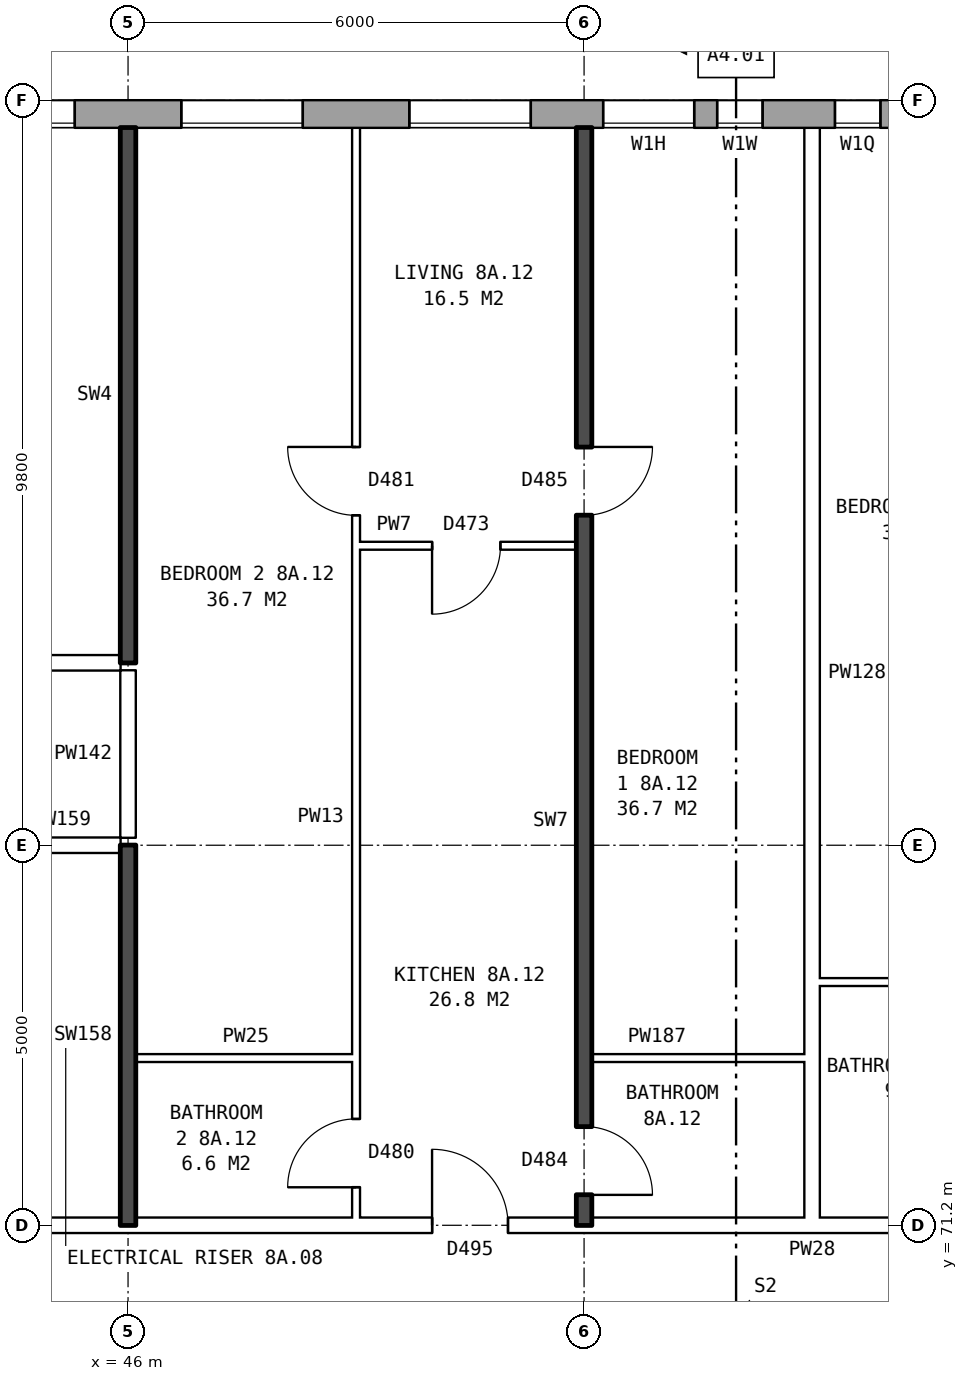
"""IFC4 building model, lengths in metres.
Left out: names, types, materials, properties, quantities, classifications, styles, units other than length and angle.
Written with IfcOpenShell. Run it as: python <this file> out.ifc"""

import sys

from ifc_helpers import new_model, si_unit, direction, frame, frame_2d, origin, place, context, subcontext, project, spatial, rectangle, extrude, element, fill, save


model = new_model("IFC4")
c1 = context("Model", 3, precision=1e-05, world=origin(), true_north=direction((0.0, 1.0)))
c2 = subcontext(c1, "Body", "Model", "MODEL_VIEW")
j1 = project(units=[si_unit("LENGTHUNIT", "METRE"), si_unit("PLANEANGLEUNIT", "RADIAN")], contexts=[c1])
p1 = place(None, origin())
s1 = spatial("IfcSite", under=j1, at=p1, CompositionType="ELEMENT")
p2 = place(p1, origin())
s2 = spatial("IfcBuilding", under=s1, at=p2, CompositionType="ELEMENT")
p3 = place(p2, frame((0.0, 0.0, 31.9)))
s3 = spatial("IfcBuildingStorey", under=s2, at=p3, CompositionType="ELEMENT", Elevation=31.9)
p4 = place(p3, frame((72.925, 85.82, 0.0), z_axis=(0.0, 0.0, 1.0), x_axis=(-1.0, 0.0, 0.0)))
e1 = element("IfcWall", 1, at=p4, inside=s3, PredefinedType="STANDARD", context=c2, shape_type="SweptSolid", body=[
    extrude(rectangle(XDim=50.101, YDim=0.36, at=frame_2d((25.05, 0.0))), origin(), (0.0, 0.0, 1.0), 2.85),
])
p5 = place(p4, frame((0.625, 0.0, 0.8)))
e2 = element("IfcOpeningElement", 2, at=p5, cuts=e1, PredefinedType="OPENING", context=c2, shape_type="SweptSolid", body=[
    extrude(rectangle(XDim=1.6, YDim=1.8, at=frame_2d((0.8, 0.9))), frame((0.0, 0.19, 0.0), z_axis=(0.0, -1.0, 0.0), x_axis=(1.0, 0.0, 0.0)), (0.0, 0.0, 1.0), 0.38),
])
p6 = place(p4, frame((3.625, 0.0, 0.8)))
e3 = element("IfcOpeningElement", 3, at=p6, cuts=e1, PredefinedType="OPENING", context=c2, shape_type="SweptSolid", body=[
    extrude(rectangle(XDim=1.6, YDim=1.8, at=frame_2d((0.8, 0.9))), frame((0.0, 0.19, 0.0), z_axis=(0.0, -1.0, 0.0), x_axis=(1.0, 0.0, 0.0)), (0.0, 0.0, 1.0), 0.38),
])
p7 = place(p4, frame((6.625, 0.0, 0.8)))
e4 = element("IfcOpeningElement", 4, at=p7, cuts=e1, PredefinedType="OPENING", context=c2, shape_type="SweptSolid", body=[
    extrude(rectangle(XDim=1.6, YDim=1.8, at=frame_2d((0.8, 0.9))), frame((0.0, 0.19, 0.0), z_axis=(0.0, -1.0, 0.0), x_axis=(1.0, 0.0, 0.0)), (0.0, 0.0, 1.0), 0.38),
])
p8 = place(p4, frame((9.625, 0.0, 0.8)))
e5 = element("IfcOpeningElement", 5, at=p8, cuts=e1, PredefinedType="OPENING", context=c2, shape_type="SweptSolid", body=[
    extrude(rectangle(XDim=1.6, YDim=1.8, at=frame_2d((0.8, 0.9))), frame((0.0, 0.19, 0.0), z_axis=(0.0, -1.0, 0.0), x_axis=(1.0, 0.0, 0.0)), (0.0, 0.0, 1.0), 0.38),
])
p9 = place(p4, frame((12.625, 0.0, 0.8)))
e6 = element("IfcOpeningElement", 6, at=p9, cuts=e1, PredefinedType="OPENING", context=c2, shape_type="SweptSolid", body=[
    extrude(rectangle(XDim=1.6, YDim=1.8, at=frame_2d((0.8, 0.9))), frame((0.0, 0.19, 0.0), z_axis=(0.0, -1.0, 0.0), x_axis=(1.0, 0.0, 0.0)), (0.0, 0.0, 1.0), 0.38),
])
p10 = place(p4, frame((15.125, 0.0, 0.8)))
e7 = element("IfcOpeningElement", 7, at=p10, cuts=e1, PredefinedType="OPENING", context=c2, shape_type="SweptSolid", body=[
    extrude(rectangle(XDim=1.6, YDim=1.8, at=frame_2d((0.8, 0.9))), frame((0.0, 0.19, 0.0), z_axis=(0.0, -1.0, 0.0), x_axis=(1.0, 0.0, 0.0)), (0.0, 0.0, 1.0), 0.38),
])
p11 = place(p4, frame((18.575, 0.0, 0.15)))
e8 = element("IfcOpeningElement", 8, at=p11, cuts=e1, PredefinedType="OPENING", context=c2, shape_type="SweptSolid", body=[
    extrude(rectangle(XDim=0.6, YDim=0.9, at=frame_2d((0.3, 0.45))), frame((0.0, 0.19, 0.0), z_axis=(0.0, -1.0, 0.0), x_axis=(1.0, 0.0, 0.0)), (0.0, 0.0, 1.0), 0.38),
])
p12 = place(p4, frame((21.625, 0.0, 0.8)))
e9 = element("IfcOpeningElement", 9, at=p12, cuts=e1, PredefinedType="OPENING", context=c2, shape_type="SweptSolid", body=[
    extrude(rectangle(XDim=1.6, YDim=1.8, at=frame_2d((0.8, 0.9))), frame((0.0, 0.19, 0.0), z_axis=(0.0, -1.0, 0.0), x_axis=(1.0, 0.0, 0.0)), (0.0, 0.0, 1.0), 0.38),
])
p13 = place(p4, frame((24.625, 0.0, 0.8)))
e10 = element("IfcOpeningElement", 10, at=p13, cuts=e1, PredefinedType="OPENING", context=c2, shape_type="SweptSolid", body=[
    extrude(rectangle(XDim=1.6, YDim=1.8, at=frame_2d((0.8, 0.9))), frame((0.0, 0.19, 0.0), z_axis=(0.0, -1.0, 0.0), x_axis=(1.0, 0.0, 0.0)), (0.0, 0.0, 1.0), 0.38),
])
p14 = place(p4, frame((27.625, 0.0, 0.8)))
e11 = element("IfcOpeningElement", 11, at=p14, cuts=e1, PredefinedType="OPENING", context=c2, shape_type="SweptSolid", body=[
    extrude(rectangle(XDim=1.6, YDim=1.8, at=frame_2d((0.8, 0.9))), frame((0.0, 0.19, 0.0), z_axis=(0.0, -1.0, 0.0), x_axis=(1.0, 0.0, 0.0)), (0.0, 0.0, 1.0), 0.38),
])
p15 = place(p4, frame((29.525, 0.0, 0.8)))
e12 = element("IfcOpeningElement", 12, at=p15, cuts=e1, PredefinedType="OPENING", context=c2, shape_type="SweptSolid", body=[
    extrude(rectangle(XDim=1.0, YDim=0.9, at=frame_2d((0.5, 0.45))), frame((0.0, 0.19, 0.0), z_axis=(0.0, -1.0, 0.0), x_axis=(1.0, 0.0, 0.0)), (0.0, 0.0, 1.0), 0.38),
])
p16 = place(p4, frame((33.625, 0.0, 0.8)))
e13 = element("IfcOpeningElement", 13, at=p16, cuts=e1, PredefinedType="OPENING", context=c2, shape_type="SweptSolid", body=[
    extrude(rectangle(XDim=1.6, YDim=1.8, at=frame_2d((0.8, 0.9))), frame((0.0, 0.19, 0.0), z_axis=(0.0, -1.0, 0.0), x_axis=(1.0, 0.0, 0.0)), (0.0, 0.0, 1.0), 0.38),
])
p17 = place(p4, frame((36.625, 0.0, 0.8)))
e14 = element("IfcOpeningElement", 14, at=p17, cuts=e1, PredefinedType="OPENING", context=c2, shape_type="SweptSolid", body=[
    extrude(rectangle(XDim=1.6, YDim=1.8, at=frame_2d((0.8, 0.9))), frame((0.0, 0.19, 0.0), z_axis=(0.0, -1.0, 0.0), x_axis=(1.0, 0.0, 0.0)), (0.0, 0.0, 1.0), 0.38),
])
p18 = place(p4, frame((39.625, 0.0, 0.8)))
e15 = element("IfcOpeningElement", 15, at=p18, cuts=e1, PredefinedType="OPENING", context=c2, shape_type="SweptSolid", body=[
    extrude(rectangle(XDim=1.6, YDim=1.8, at=frame_2d((0.8, 0.9))), frame((0.0, 0.19, 0.0), z_axis=(0.0, -1.0, 0.0), x_axis=(1.0, 0.0, 0.0)), (0.0, 0.0, 1.0), 0.38),
])
p19 = place(p4, frame((42.625, 0.0, 0.8)))
e16 = element("IfcOpeningElement", 16, at=p19, cuts=e1, PredefinedType="OPENING", context=c2, shape_type="SweptSolid", body=[
    extrude(rectangle(XDim=1.6, YDim=1.8, at=frame_2d((0.8, 0.9))), frame((0.0, 0.19, 0.0), z_axis=(0.0, -1.0, 0.0), x_axis=(1.0, 0.0, 0.0)), (0.0, 0.0, 1.0), 0.38),
])
p20 = place(p4, frame((45.625, 0.0, 0.8)))
e17 = element("IfcOpeningElement", 17, at=p20, cuts=e1, PredefinedType="OPENING", context=c2, shape_type="SweptSolid", body=[
    extrude(rectangle(XDim=1.6, YDim=1.8, at=frame_2d((0.8, 0.9))), frame((0.0, 0.19, 0.0), z_axis=(0.0, -1.0, 0.0), x_axis=(1.0, 0.0, 0.0)), (0.0, 0.0, 1.0), 0.38),
])
p21 = place(p4, frame((17.025, 0.0, 1.4)))
e18 = element("IfcOpeningElement", 18, at=p21, cuts=e1, PredefinedType="OPENING", context=c2, shape_type="SweptSolid", body=[
    extrude(rectangle(XDim=0.6, YDim=1.2, at=frame_2d((0.3, 0.6))), frame((0.0, 0.19, 0.0), z_axis=(0.0, -1.0, 0.0), x_axis=(1.0, 0.0, 0.0)), (0.0, 0.0, 1.0), 0.38),
])
p22 = place(p4, frame((19.475, 0.0, 0.15)))
e19 = element("IfcOpeningElement", 19, at=p22, cuts=e1, PredefinedType="OPENING", context=c2, shape_type="SweptSolid", body=[
    extrude(rectangle(XDim=1.2, YDim=1.5, at=frame_2d((0.6, 0.75))), frame((0.0, 0.19, 0.0), z_axis=(0.0, -1.0, 0.0), x_axis=(1.0, 0.0, 0.0)), (0.0, 0.0, 1.0), 0.38),
])
p23 = place(p4, frame((31.975, 0.0, 1.7)))
e20 = element("IfcOpeningElement", 20, at=p23, cuts=e1, PredefinedType="OPENING", context=c2, shape_type="SweptSolid", body=[
    extrude(rectangle(XDim=0.6, YDim=0.9, at=frame_2d((0.3, 0.45))), frame((0.0, 0.19, 0.0), z_axis=(0.0, -1.0, 0.0), x_axis=(1.0, 0.0, 0.0)), (0.0, 0.0, 1.0), 0.38),
])
p24 = place(p3, frame((44.36, 71.2, 0.0), z_axis=(0.0, 0.0, 1.0), x_axis=(1.0, 0.0, 0.0)))
e21 = element("IfcWall", 21, at=p24, inside=s3, PredefinedType="PARTITIONING", context=c2, shape_type="SweptSolid", body=[
    extrude(rectangle(XDim=19.28, YDim=0.2, at=frame_2d((9.64, 0.0))), origin(), (0.0, 0.0, 1.0), 2.85),
])
p25 = place(p24, frame((14.64, 0.0, 0.0)))
e22 = element("IfcOpeningElement", 22, at=p25, cuts=e21, PredefinedType="OPENING", context=c2, shape_type="SweptSolid", body=[
    extrude(rectangle(XDim=1.0, YDim=2.1, at=frame_2d((0.5, 1.05))), frame((0.0, 0.11, 0.0), z_axis=(0.0, -1.0, 0.0), x_axis=(1.0, 0.0, 0.0)), (0.0, 0.0, 1.0), 0.22),
])
p26 = place(p24, frame((5.64, 0.0, 0.0)))
e23 = element("IfcOpeningElement", 23, at=p26, cuts=e21, PredefinedType="OPENING", context=c2, shape_type="SweptSolid", body=[
    extrude(rectangle(XDim=1.0, YDim=2.1, at=frame_2d((0.5, 1.05))), frame((0.0, 0.11, 0.0), z_axis=(0.0, -1.0, 0.0), x_axis=(1.0, 0.0, 0.0)), (0.0, 0.0, 1.0), 0.22),
])
p27 = place(p3, frame((46.1, 73.4, 0.0), z_axis=(0.0, 0.0, 1.0), x_axis=(1.0, 0.0, 0.0)))
e24 = element("IfcWall", 24, at=p27, inside=s3, PredefinedType="PARTITIONING", context=c2, shape_type="SweptSolid", body=[
    extrude(rectangle(XDim=2.9, YDim=0.1, at=frame_2d((1.45, 0.0))), origin(), (0.0, 0.0, 1.0), 2.85),
])
for number, where, z_axis, x_axis in (
    (25, (52.1, 73.4, 0.0), (0.0, 0.0, 1.0), (1.0, 0.0, 0.0)),
    (26, (55.1, 74.4, 0.0), (0.0, 0.0, 1.0), (1.0, 0.0, 0.0)),
):
    element("IfcWall", number, at=place(p3, frame(where, z_axis=z_axis, x_axis=x_axis)), inside=s3, PredefinedType="PARTITIONING", context=c2, shape_type="SweptSolid", body=[
        extrude(rectangle(XDim=2.8, YDim=0.1, at=frame_2d((1.4, 0.0))), origin(), (0.0, 0.0, 1.0), 2.85),
    ])
p28 = place(p3, frame((44.36, 76.2, 0.0), z_axis=(0.0, 0.0, 1.0), x_axis=(1.0, 0.0, 0.0)))
e27 = element("IfcWall", 27, at=p28, inside=s3, PredefinedType="PARTITIONING", context=c2, shape_type="SweptSolid", body=[
    extrude(rectangle(XDim=1.54, YDim=0.2, at=frame_2d((0.77, 0.0))), origin(), (0.0, 0.0, 1.0), 2.85),
])
p29 = place(p3, frame((20.11, 78.6, 0.0), z_axis=(0.0, 0.0, 1.0), x_axis=(1.0, 0.0, 0.0)))
e28 = element("IfcWall", 28, at=p29, inside=s3, PredefinedType="PARTITIONING", context=c2, shape_type="SweptSolid", body=[
    extrude(rectangle(XDim=25.79, YDim=0.2, at=frame_2d((12.895, 0.0))), origin(), (0.0, 0.0, 1.0), 2.85),
])
p30 = place(p29, frame((22.34, 0.0, 0.0)))
e29 = element("IfcOpeningElement", 29, at=p30, cuts=e28, PredefinedType="OPENING", context=c2, shape_type="SweptSolid", body=[
    extrude(rectangle(XDim=1.0, YDim=2.1, at=frame_2d((0.5, 1.05))), frame((0.0, 0.11, 0.0), z_axis=(0.0, -1.0, 0.0), x_axis=(1.0, 0.0, 0.0)), (0.0, 0.0, 1.0), 0.22),
])
p31 = place(p29, frame((10.39, 0.0, 0.0)))
e30 = element("IfcOpeningElement", 30, at=p31, cuts=e28, PredefinedType="OPENING", context=c2, shape_type="SweptSolid", body=[
    extrude(rectangle(XDim=1.0, YDim=2.1, at=frame_2d((0.5, 1.05))), frame((0.0, 0.11, 0.0), z_axis=(0.0, -1.0, 0.0), x_axis=(1.0, 0.0, 0.0)), (0.0, 0.0, 1.0), 0.22),
])
p32 = place(p29, frame((2.245, 0.0, 0.0)))
e31 = element("IfcOpeningElement", 31, at=p32, cuts=e28, PredefinedType="OPENING", context=c2, shape_type="SweptSolid", body=[
    extrude(rectangle(XDim=1.0, YDim=2.1, at=frame_2d((0.5, 1.05))), frame((0.0, 0.11, 0.0), z_axis=(0.0, -1.0, 0.0), x_axis=(1.0, 0.0, 0.0)), (0.0, 0.0, 1.0), 0.22),
])
p33 = place(p3, frame((49.0, 80.14, 0.0), z_axis=(0.0, 0.0, 1.0), x_axis=(1.0, 0.0, 0.0)))
e32 = element("IfcWall", 32, at=p33, inside=s3, PredefinedType="PARTITIONING", context=c2, shape_type="SweptSolid", body=[
    extrude(rectangle(XDim=2.9, YDim=0.1, at=frame_2d((1.45, 0.0))), origin(), (0.0, 0.0, 1.0), 2.85),
])
p34 = place(p33, frame((1.0, 0.0, 0.0)))
e33 = element("IfcOpeningElement", 33, at=p34, cuts=e32, PredefinedType="OPENING", context=c2, shape_type="SweptSolid", body=[
    extrude(rectangle(XDim=0.9, YDim=2.1, at=frame_2d((0.45, 1.05))), frame((0.0, 0.06, 0.0), z_axis=(0.0, -1.0, 0.0), x_axis=(1.0, 0.0, 0.0)), (0.0, 0.0, 1.0), 0.12),
])
p35 = place(p3, frame((46.0, 71.2, 0.0), z_axis=(0.0, 0.0, 1.0), x_axis=(0.0, 1.0, 0.0)))
e34 = element("IfcWall", 34, at=p35, inside=s3, PredefinedType="SOLIDWALL", context=c2, shape_type="SweptSolid", body=[
    extrude(rectangle(XDim=5.0, YDim=0.2, at=frame_2d((2.5, 0.0))), origin(), (0.0, 0.0, 1.0), 2.85),
])
p36 = place(p3, frame((46.0, 76.3, 0.0), z_axis=(0.0, 0.0, 1.0), x_axis=(0.0, 1.0, 0.0)))
e35 = element("IfcWall", 35, at=p36, inside=s3, PredefinedType="PARTITIONING", context=c2, shape_type="SweptSolid", body=[
    extrude(rectangle(XDim=2.2, YDim=0.2, at=frame_2d((1.1, 0.0))), origin(), (0.0, 0.0, 1.0), 2.85),
])
p37 = place(p3, frame((46.0, 78.6, 0.0), z_axis=(0.0, 0.0, 1.0), x_axis=(0.0, 1.0, 0.0)))
e36 = element("IfcWall", 36, at=p37, inside=s3, PredefinedType="SOLIDWALL", context=c2, shape_type="SweptSolid", body=[
    extrude(rectangle(XDim=7.04, YDim=0.2, at=frame_2d((3.52, 0.0))), origin(), (0.0, 0.0, 1.0), 2.85),
])
p38 = place(p3, frame((49.0, 71.3, 0.0), z_axis=(0.0, 0.0, 1.0), x_axis=(0.0, 1.0, 0.0)))
e37 = element("IfcWall", 37, at=p38, inside=s3, PredefinedType="PARTITIONING", context=c2, shape_type="SweptSolid", body=[
    extrude(rectangle(XDim=14.34, YDim=0.1, at=frame_2d((7.17, 0.0))), origin(), (0.0, 0.0, 1.0), 2.85),
])
p39 = place(p38, frame((9.24, 0.0, 0.0)))
e38 = element("IfcOpeningElement", 38, at=p39, cuts=e37, PredefinedType="OPENING", context=c2, shape_type="SweptSolid", body=[
    extrude(rectangle(XDim=0.9, YDim=2.1, at=frame_2d((0.45, 1.05))), frame((0.0, 0.06, 0.0), z_axis=(0.0, -1.0, 0.0), x_axis=(1.0, 0.0, 0.0)), (0.0, 0.0, 1.0), 0.12),
])
p40 = place(p38, frame((0.4, 0.0, 0.0)))
e39 = element("IfcOpeningElement", 39, at=p40, cuts=e37, PredefinedType="OPENING", context=c2, shape_type="SweptSolid", body=[
    extrude(rectangle(XDim=0.9, YDim=2.1, at=frame_2d((0.45, 1.05))), frame((0.0, 0.06, 0.0), z_axis=(0.0, -1.0, 0.0), x_axis=(1.0, 0.0, 0.0)), (0.0, 0.0, 1.0), 0.12),
])
p41 = place(p3, frame((52.0, 71.2, 0.0), z_axis=(0.0, 0.0, 1.0), x_axis=(0.0, 1.0, 0.0)))
e40 = element("IfcWall", 40, at=p41, inside=s3, PredefinedType="SOLIDWALL", context=c2, shape_type="SweptSolid", body=[
    extrude(rectangle(XDim=14.44, YDim=0.2, at=frame_2d((7.22, 0.0))), origin(), (0.0, 0.0, 1.0), 2.85),
])
p42 = place(p41, frame((9.34, 0.0, 0.0)))
e41 = element("IfcOpeningElement", 41, at=p42, cuts=e40, PredefinedType="OPENING", context=c2, shape_type="SweptSolid", body=[
    extrude(rectangle(XDim=0.9, YDim=2.1, at=frame_2d((0.45, 1.05))), frame((0.0, 0.11, 0.0), z_axis=(0.0, -1.0, 0.0), x_axis=(1.0, 0.0, 0.0)), (0.0, 0.0, 1.0), 0.22),
])
p43 = place(p41, frame((0.4, 0.0, 0.0)))
e42 = element("IfcOpeningElement", 42, at=p43, cuts=e40, PredefinedType="OPENING", context=c2, shape_type="SweptSolid", body=[
    extrude(rectangle(XDim=0.9, YDim=2.1, at=frame_2d((0.45, 1.05))), frame((0.0, 0.11, 0.0), z_axis=(0.0, -1.0, 0.0), x_axis=(1.0, 0.0, 0.0)), (0.0, 0.0, 1.0), 0.22),
])
p44 = place(p3, frame((55.0, 71.3, 0.0), z_axis=(0.0, 0.0, 1.0), x_axis=(0.0, 1.0, 0.0)))
e43 = element("IfcWall", 43, at=p44, inside=s3, PredefinedType="PARTITIONING", context=c2, shape_type="SweptSolid", body=[
    extrude(rectangle(XDim=14.34, YDim=0.2, at=frame_2d((7.17, 0.0))), origin(), (0.0, 0.0, 1.0), 2.85),
])
p45 = place(p11, origin())
e44 = element("IfcWindow", 44, at=p45, inside=s3, PartitioningType="SINGLE_PANEL", PredefinedType="WINDOW", context=c2, shape_type="SweptSolid", body=[
    extrude(rectangle(XDim=0.6, YDim=0.9, at=frame_2d((0.3, 0.45))), frame((0.0, 0.15, 0.0), z_axis=(0.0, -1.0, 0.0), x_axis=(1.0, 0.0, 0.0)), (0.0, 0.0, 1.0), 0.06),
])
fill(e8, e44)
p46 = place(p12, origin())
e45 = element("IfcWindow", 45, at=p46, inside=s3, PartitioningType="SINGLE_PANEL", PredefinedType="WINDOW", context=c2, shape_type="SweptSolid", body=[
    extrude(rectangle(XDim=1.6, YDim=1.8, at=frame_2d((0.8, 0.9))), frame((0.0, 0.15, 0.0), z_axis=(0.0, -1.0, 0.0), x_axis=(1.0, 0.0, 0.0)), (0.0, 0.0, 1.0), 0.06),
])
fill(e9, e45)
p47 = place(p13, origin())
e46 = element("IfcWindow", 46, at=p47, inside=s3, PartitioningType="SINGLE_PANEL", PredefinedType="WINDOW", context=c2, shape_type="SweptSolid", body=[
    extrude(rectangle(XDim=1.6, YDim=1.8, at=frame_2d((0.8, 0.9))), frame((0.0, 0.15, 0.0), z_axis=(0.0, -1.0, 0.0), x_axis=(1.0, 0.0, 0.0)), (0.0, 0.0, 1.0), 0.06),
])
fill(e10, e46)
p48 = place(p14, origin())
e47 = element("IfcWindow", 47, at=p48, inside=s3, PartitioningType="SINGLE_PANEL", PredefinedType="WINDOW", context=c2, shape_type="SweptSolid", body=[
    extrude(rectangle(XDim=1.6, YDim=1.8, at=frame_2d((0.8, 0.9))), frame((0.0, 0.15, 0.0), z_axis=(0.0, -1.0, 0.0), x_axis=(1.0, 0.0, 0.0)), (0.0, 0.0, 1.0), 0.06),
])
fill(e11, e47)
p49 = place(p42, frame((0.9, 0.0, 0.0), z_axis=(0.0, 0.0, 1.0), x_axis=(-1.0, 0.0, 0.0)))
e48 = element("IfcDoor", 48, at=p49, inside=s3, OperationType="SINGLE_SWING_LEFT", PredefinedType="DOOR", context=c2, shape_type="SweptSolid", body=[
    extrude(rectangle(XDim=0.9, YDim=2.1, at=frame_2d((0.45, 1.05))), frame((0.0, 0.025, 0.0), z_axis=(0.0, -1.0, 0.0), x_axis=(1.0, 0.0, 0.0)), (0.0, 0.0, 1.0), 0.05),
])
fill(e41, e48)
p50 = place(p39, origin())
e49 = element("IfcDoor", 49, at=p50, inside=s3, OperationType="SINGLE_SWING_RIGHT", PredefinedType="DOOR", context=c2, shape_type="SweptSolid", body=[
    extrude(rectangle(XDim=0.9, YDim=2.1, at=frame_2d((0.45, 1.05))), frame((0.0, 0.025, 0.0), z_axis=(0.0, -1.0, 0.0), x_axis=(1.0, 0.0, 0.0)), (0.0, 0.0, 1.0), 0.05),
])
fill(e38, e49)
p51 = place(p26, origin())
e50 = element("IfcDoor", 50, at=p51, inside=s3, OperationType="SINGLE_SWING_LEFT", PredefinedType="DOOR", context=c2, shape_type="SweptSolid", body=[
    extrude(rectangle(XDim=1.0, YDim=2.1, at=frame_2d((0.5, 1.05))), frame((0.0, 0.025, 0.0), z_axis=(0.0, -1.0, 0.0), x_axis=(1.0, 0.0, 0.0)), (0.0, 0.0, 1.0), 0.05),
])
fill(e23, e50)
p52 = place(p34, frame((0.9, 0.0, 0.0), z_axis=(0.0, 0.0, 1.0), x_axis=(-1.0, 0.0, 0.0)))
e51 = element("IfcDoor", 51, at=p52, inside=s3, OperationType="SINGLE_SWING_RIGHT", PredefinedType="DOOR", context=c2, shape_type="SweptSolid", body=[
    extrude(rectangle(XDim=0.9, YDim=2.1, at=frame_2d((0.45, 1.05))), frame((0.0, 0.025, 0.0), z_axis=(0.0, -1.0, 0.0), x_axis=(1.0, 0.0, 0.0)), (0.0, 0.0, 1.0), 0.05),
])
fill(e33, e51)
p53 = place(p43, frame((0.9, 0.0, 0.0), z_axis=(0.0, 0.0, 1.0), x_axis=(-1.0, 0.0, 0.0)))
e52 = element("IfcDoor", 52, at=p53, inside=s3, OperationType="SINGLE_SWING_RIGHT", PredefinedType="DOOR", context=c2, shape_type="SweptSolid", body=[
    extrude(rectangle(XDim=0.9, YDim=2.1, at=frame_2d((0.45, 1.05))), frame((0.0, 0.025, 0.0), z_axis=(0.0, -1.0, 0.0), x_axis=(1.0, 0.0, 0.0)), (0.0, 0.0, 1.0), 0.05),
])
fill(e42, e52)
p54 = place(p40, origin())
e53 = element("IfcDoor", 53, at=p54, inside=s3, OperationType="SINGLE_SWING_LEFT", PredefinedType="DOOR", context=c2, shape_type="SweptSolid", body=[
    extrude(rectangle(XDim=0.9, YDim=2.1, at=frame_2d((0.45, 1.05))), frame((0.0, 0.025, 0.0), z_axis=(0.0, -1.0, 0.0), x_axis=(1.0, 0.0, 0.0)), (0.0, 0.0, 1.0), 0.05),
])
fill(e39, e53)
p55 = place(p21, origin())
e54 = element("IfcWindow", 54, at=p55, inside=s3, PartitioningType="SINGLE_PANEL", PredefinedType="WINDOW", context=c2, shape_type="SweptSolid", body=[
    extrude(rectangle(XDim=0.6, YDim=1.2, at=frame_2d((0.3, 0.6))), frame((0.0, 0.15, 0.0), z_axis=(0.0, -1.0, 0.0), x_axis=(1.0, 0.0, 0.0)), (0.0, 0.0, 1.0), 0.06),
])
fill(e18, e54)
p56 = place(p22, origin())
e55 = element("IfcWindow", 55, at=p56, inside=s3, PartitioningType="SINGLE_PANEL", PredefinedType="WINDOW", context=c2, shape_type="SweptSolid", body=[
    extrude(rectangle(XDim=1.2, YDim=1.5, at=frame_2d((0.6, 0.75))), frame((0.0, 0.15, 0.0), z_axis=(0.0, -1.0, 0.0), x_axis=(1.0, 0.0, 0.0)), (0.0, 0.0, 1.0), 0.06),
])
fill(e19, e55)
save(model, sys.argv[1])
